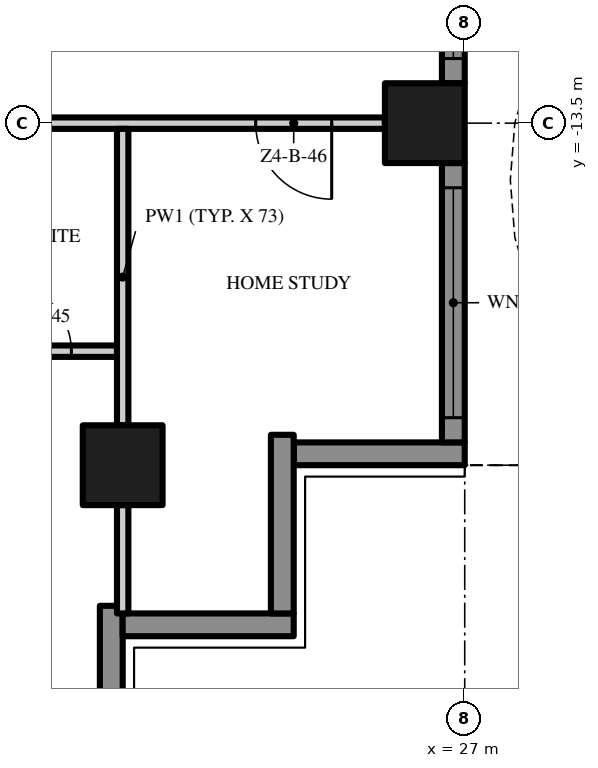
"""IFC4 building model, lengths in metres.
Left out: names, types, materials, properties, quantities, classifications, styles, units other than length and angle.
Written with IfcOpenShell. Run it as: python <this file> out.ifc"""

import sys

from ifc_helpers import new_model, si_unit, direction, frame, frame_2d, origin, origin_2d, place, context, subcontext, project, spatial, polyline, rectangle, outline, extrude, element, fill, save


model = new_model("IFC4")
c1 = context("Model", 3, precision=1e-05, world=origin(), true_north=direction((0.0, 1.0)))
c2 = subcontext(c1, "Body", "Model", "MODEL_VIEW")
j1 = project(units=[si_unit("LENGTHUNIT", "METRE"), si_unit("PLANEANGLEUNIT", "RADIAN")], contexts=[c1])
p1 = place(None, origin())
s1 = spatial("IfcSite", under=j1, at=p1, CompositionType="ELEMENT")
p2 = place(p1, origin())
s2 = spatial("IfcBuilding", under=s1, at=p2, CompositionType="ELEMENT")
p3 = place(p2, frame((0.0, 0.0, 195.8)))
s3 = spatial("IfcBuildingStorey", under=s2, at=p3, CompositionType="ELEMENT", Elevation=195.8)
for number, where, z_axis, x_axis in (
    (1, (26.475, -13.5, 0.0), (0.0, 0.0, 1.0), (1.0, 0.0, 0.0)),
    (2, (22.5, -18.0, 0.0), (0.0, 0.0, 1.0), (1.0, 0.0, 0.0)),
):
    element("IfcColumn", number, at=place(p3, frame(where, z_axis=z_axis, x_axis=x_axis)), inside=s3, PredefinedType="COLUMN", context=c2, shape_type="SweptSolid", body=[
        extrude(rectangle(XDim=1.05, YDim=1.05, at=origin_2d()), origin(), (0.0, 0.0, 1.0), 3.5),
    ])
p4 = place(p3, frame((22.35, -19.85, 0.0), z_axis=(0.0, 0.0, 1.0), x_axis=(0.0, -1.0, 0.0)))
e3 = element("IfcWall", 3, at=p4, inside=s3, PredefinedType="SOLIDWALL", context=c2, shape_type="SweptSolid", body=[
    extrude(rectangle(XDim=2.35, YDim=0.3, at=frame_2d((1.175, 0.0))), origin(), (0.0, 0.0, 1.0), 3.5),
])
p5 = place(p3, frame((24.75, -20.1, 0.0), z_axis=(0.0, 0.0, 1.0), x_axis=(-1.0, 0.0, 0.0)))
e4 = element("IfcWall", 4, at=p5, inside=s3, PredefinedType="SOLIDWALL", context=c2, shape_type="SweptSolid", body=[
    extrude(rectangle(XDim=2.25, YDim=0.3, at=frame_2d((1.125, 0.0))), origin(), (0.0, 0.0, 1.0), 3.5),
])
p6 = place(p3, frame((24.6, -17.6, 0.0), z_axis=(0.0, 0.0, 1.0), x_axis=(0.0, -1.0, 0.0)))
e5 = element("IfcWall", 5, at=p6, inside=s3, PredefinedType="SOLIDWALL", context=c2, shape_type="SweptSolid", body=[
    extrude(rectangle(XDim=2.35, YDim=0.3, at=frame_2d((1.175, 0.0))), origin(), (0.0, 0.0, 1.0), 3.5),
])
p7 = place(p3, frame((27.0, -17.85, 0.0), z_axis=(0.0, 0.0, 1.0), x_axis=(-1.0, 0.0, 0.0)))
e6 = element("IfcWall", 6, at=p7, inside=s3, PredefinedType="SOLIDWALL", context=c2, shape_type="SweptSolid", body=[
    extrude(rectangle(XDim=2.25, YDim=0.3, at=frame_2d((1.125, 0.0))), origin(), (0.0, 0.0, 1.0), 3.5),
])
p8 = place(p3, frame((26.85, -14.025, 0.0), z_axis=(0.0, 0.0, 1.0), x_axis=(0.0, -1.0, 0.0)))
e7 = element("IfcWall", 7, at=p8, inside=s3, PredefinedType="SOLIDWALL", context=c2, shape_type="SweptSolid", body=[
    extrude(rectangle(XDim=3.675, YDim=0.3, at=frame_2d((1.837, 0.0))), origin(), (0.0, 0.0, 1.0), 3.5),
])
p9 = place(p8, frame((0.325, 0.0, 0.45)))
e8 = element("IfcOpeningElement", 8, at=p9, cuts=e7, PredefinedType="OPENING", context=c2, shape_type="SweptSolid", body=[
    extrude(rectangle(XDim=3.025, YDim=2.65, at=frame_2d((1.512, 1.325))), frame((0.0, 0.16, 0.0), z_axis=(0.0, -1.0, 0.0), x_axis=(1.0, 0.0, 0.0)), (0.0, 0.0, 1.0), 0.32),
])
p10 = place(p3, frame((26.85, -5.025, 0.0), z_axis=(0.0, 0.0, 1.0), x_axis=(0.0, -1.0, 0.0)))
e9 = element("IfcWall", 9, at=p10, inside=s3, PredefinedType="SOLIDWALL", context=c2, shape_type="SweptSolid", body=[
    extrude(rectangle(XDim=7.95, YDim=0.3, at=frame_2d((3.975, 0.0))), origin(), (0.0, 0.0, 1.0), 3.5),
])
p11 = place(p10, frame((4.6, 0.0, 0.45)))
e10 = element("IfcOpeningElement", 10, at=p11, cuts=e9, PredefinedType="OPENING", context=c2, shape_type="SweptSolid", body=[
    extrude(rectangle(XDim=3.025, YDim=2.65, at=frame_2d((1.512, 1.325))), frame((0.0, 0.16, 0.0), z_axis=(0.0, -1.0, 0.0), x_axis=(1.0, 0.0, 0.0)), (0.0, 0.0, 1.0), 0.32),
])
p12 = place(p10, frame((0.325, 0.0, 0.0)))
e11 = element("IfcOpeningElement", 11, at=p12, cuts=e9, PredefinedType="OPENING", context=c2, shape_type="SweptSolid", body=[
    extrude(rectangle(XDim=3.025, YDim=2.4, at=frame_2d((1.512, 1.2))), frame((0.0, 0.16, 0.0), z_axis=(0.0, -1.0, 0.0), x_axis=(1.0, 0.0, 0.0)), (0.0, 0.0, 1.0), 0.32),
])
p13 = place(p3, origin())
e12 = element("IfcWall", 12, at=p13, inside=s3, PredefinedType="USERDEFINED", context=c2, shape_type="SweptSolid", body=[
    extrude(outline(polyline([(28.8, -18.0), (28.095, -16.5), (27.659, -15.0), (27.6, -14.25), (27.659, -13.5), (28.095, -12.0), (28.8, -10.5), (29.505, -9.0), (29.941, -7.5), (30.0, -6.75), (29.941, -6.0), (29.505, -4.5), (28.8, -3.0), (28.095, -1.5), (27.659, 0.0), (27.6, 0.75), (27.659, 1.5), (28.095, 3.0), (28.8, 4.5), (29.505, 6.0), (29.941, 7.5), (30.0, 8.25), (29.941, 9.0), (29.505, 10.5), (28.8, 12.0), (28.095, 13.5), (27.659, 15.0), (27.6, 15.75), (27.659, 16.5), (28.095, 18.0), (27.855, 18.07), (27.411, 16.545), (27.349, 15.75), (27.411, 14.955), (27.86, 13.411), (28.574, 11.894), (29.271, 10.411), (29.694, 8.955), (29.749, 8.25), (29.694, 7.545), (29.271, 6.089), (28.574, 4.606), (27.86, 3.089), (27.411, 1.545), (27.349, 0.75), (27.411, -0.045), (27.86, -1.589), (28.574, -3.106), (29.271, -4.589), (29.694, -6.045), (29.749, -6.75), (29.694, -7.455), (29.271, -8.911), (28.574, -10.394), (27.86, -11.911), (27.411, -13.455), (27.349, -14.25), (27.411, -15.045), (27.86, -16.589), (28.574, -18.106), (28.8, -18.0)])), origin(), (0.0, 0.0, 1.0), 0.9),
])
p14 = place(p3, frame((20.325, -16.5, 0.0), z_axis=(0.0, 0.0, 1.0), x_axis=(1.0, 0.0, 0.0)))
e13 = element("IfcWall", 13, at=p14, inside=s3, PredefinedType="PARTITIONING", context=c2, shape_type="SweptSolid", body=[
    extrude(rectangle(XDim=2.1, YDim=0.15, at=frame_2d((1.05, 0.0))), origin(), (0.0, 0.0, 1.0), 3.5),
])
p15 = place(p14, frame((0.6, 0.0, 0.0)))
e14 = element("IfcOpeningElement", 14, at=p15, cuts=e13, PredefinedType="OPENING", context=c2, shape_type="SweptSolid", body=[
    extrude(rectangle(XDim=0.9, YDim=2.1, at=frame_2d((0.45, 1.05))), frame((0.0, 0.085, 0.0), z_axis=(0.0, -1.0, 0.0), x_axis=(1.0, 0.0, 0.0)), (0.0, 0.0, 1.0), 0.17),
])
p16 = place(p3, frame((25.95, -13.5, 0.0), z_axis=(0.0, 0.0, 1.0), x_axis=(-1.0, 0.0, 0.0)))
e15 = element("IfcWall", 15, at=p16, inside=s3, PredefinedType="PARTITIONING", context=c2, shape_type="SweptSolid", body=[
    extrude(rectangle(XDim=7.375, YDim=0.15, at=frame_2d((3.688, 0.0))), origin(), (0.0, 0.0, 1.0), 3.5),
])
p17 = place(p16, frame((6.225, 0.0, 0.0)))
e16 = element("IfcOpeningElement", 16, at=p17, cuts=e15, PredefinedType="OPENING", context=c2, shape_type="SweptSolid", body=[
    extrude(rectangle(XDim=1.0, YDim=2.4, at=frame_2d((0.5, 1.2))), frame((0.0, 0.085, 0.0), z_axis=(0.0, -1.0, 0.0), x_axis=(1.0, 0.0, 0.0)), (0.0, 0.0, 1.0), 0.17),
])
p18 = place(p16, frame((0.7, 0.0, 0.0)))
e17 = element("IfcOpeningElement", 17, at=p18, cuts=e15, PredefinedType="OPENING", context=c2, shape_type="SweptSolid", body=[
    extrude(rectangle(XDim=1.0, YDim=2.4, at=frame_2d((0.5, 1.2))), frame((0.0, 0.085, 0.0), z_axis=(0.0, -1.0, 0.0), x_axis=(1.0, 0.0, 0.0)), (0.0, 0.0, 1.0), 0.17),
])
p19 = place(p3, frame((22.5, -19.95, 0.0), z_axis=(0.0, 0.0, 1.0), x_axis=(0.0, 1.0, 0.0)))
e18 = element("IfcWall", 18, at=p19, inside=s3, PredefinedType="PARTITIONING", context=c2, shape_type="SweptSolid", body=[
    extrude(rectangle(XDim=1.425, YDim=0.15, at=frame_2d((0.713, 0.0))), origin(), (0.0, 0.0, 1.0), 3.5),
])
p20 = place(p3, frame((22.5, -17.475, 0.0), z_axis=(0.0, 0.0, 1.0), x_axis=(0.0, 1.0, 0.0)))
e19 = element("IfcWall", 19, at=p20, inside=s3, PredefinedType="PARTITIONING", context=c2, shape_type="SweptSolid", body=[
    extrude(rectangle(XDim=3.9, YDim=0.15, at=frame_2d((1.95, 0.0))), origin(), (0.0, 0.0, 1.0), 3.5),
])
p21 = place(p9, origin())
e20 = element("IfcWindow", 20, at=p21, inside=s3, PartitioningType="SINGLE_PANEL", PredefinedType="WINDOW", context=c2, shape_type="SweptSolid", body=[
    extrude(rectangle(XDim=3.025, YDim=2.65, at=frame_2d((1.512, 1.325))), frame((0.0, 0.03, 0.0), z_axis=(0.0, -1.0, 0.0), x_axis=(1.0, 0.0, 0.0)), (0.0, 0.0, 1.0), 0.06),
])
fill(e8, e20)
p22 = place(p11, origin())
e21 = element("IfcWindow", 21, at=p22, inside=s3, PartitioningType="SINGLE_PANEL", PredefinedType="WINDOW", context=c2, shape_type="SweptSolid", body=[
    extrude(rectangle(XDim=3.025, YDim=2.65, at=frame_2d((1.512, 1.325))), frame((0.0, 0.03, 0.0), z_axis=(0.0, -1.0, 0.0), x_axis=(1.0, 0.0, 0.0)), (0.0, 0.0, 1.0), 0.06),
])
fill(e10, e21)
p23 = place(p15, origin())
e22 = element("IfcDoor", 22, at=p23, inside=s3, OperationType="SINGLE_SWING_LEFT", PredefinedType="DOOR", context=c2, shape_type="SweptSolid", body=[
    extrude(rectangle(XDim=0.9, YDim=2.1, at=frame_2d((0.45, 1.05))), frame((0.0, 0.025, 0.0), z_axis=(0.0, -1.0, 0.0), x_axis=(1.0, 0.0, 0.0)), (0.0, 0.0, 1.0), 0.05),
])
fill(e14, e22)
p24 = place(p18, origin())
e23 = element("IfcDoor", 23, at=p24, inside=s3, OperationType="SINGLE_SWING_LEFT", PredefinedType="DOOR", context=c2, shape_type="SweptSolid", body=[
    extrude(rectangle(XDim=1.0, YDim=2.4, at=frame_2d((0.5, 1.2))), frame((0.0, 0.025, 0.0), z_axis=(0.0, -1.0, 0.0), x_axis=(1.0, 0.0, 0.0)), (0.0, 0.0, 1.0), 0.05),
])
fill(e17, e23)
save(model, sys.argv[1])
